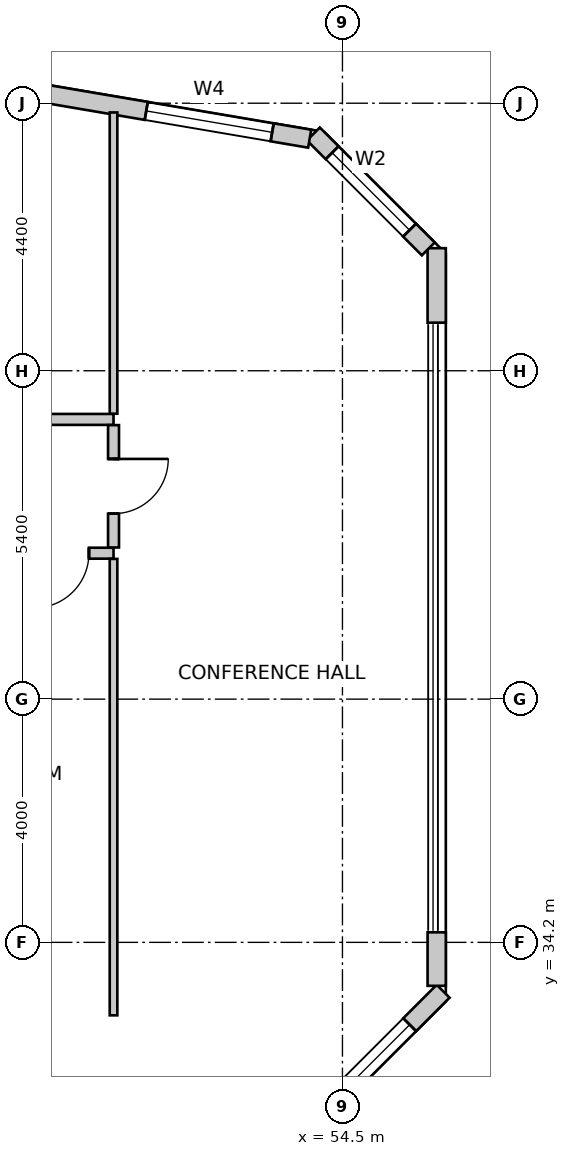
"""IFC4 building model, lengths in metres.
Left out: names, types, materials, properties, quantities, classifications, styles, units other than length and angle.
Written with IfcOpenShell. Run it as: python <this file> out.ifc"""

import sys

from ifc_helpers import new_model, si_unit, direction, frame, frame_2d, origin, place, context, subcontext, project, spatial, rectangle, extrude, source, transform, mapped, element, fill, save


model = new_model("IFC4")
c1 = context("Model", 3, precision=1e-05, world=origin(), true_north=direction((0.0, 1.0)))
c2 = subcontext(c1, "Body", "Model", "MODEL_VIEW")
j1 = project(units=[si_unit("LENGTHUNIT", "METRE"), si_unit("PLANEANGLEUNIT", "RADIAN")], contexts=[c1])
p1 = place(None, origin())
s1 = spatial("IfcSite", under=j1, at=p1, CompositionType="ELEMENT")
p2 = place(p1, origin())
s2 = spatial("IfcBuilding", under=s1, at=p2, CompositionType="ELEMENT")
p3 = place(p2, frame((0.0, 0.0, 87.0)))
s3 = spatial("IfcBuildingStorey", under=s2, at=p3, CompositionType="ELEMENT", Elevation=87.0)
p4 = place(p3, frame((53.076, 30.316, 0.0), z_axis=(0.0, 0.0, 1.0), x_axis=(0.707078757535, 0.707134803727, 0.0)))
e1 = element("IfcWall", 1, at=p4, inside=s3, PredefinedType="SOLIDWALL", context=c2, shape_type="SweptSolid", body=[
    extrude(rectangle(XDim=4.356, YDim=0.3, at=frame_2d((2.178, 0.0))), origin(), (0.0, 0.0, 1.0), 3.75),
])
m1 = source(origin(), c2, "Body", "SweptSolid", [
    extrude(rectangle(XDim=2.8, YDim=2.4, at=frame_2d((1.4, 1.2))), frame((0.0, 0.16, 0.0), z_axis=(0.0, -1.0, 0.0), x_axis=(1.0, 0.0, 0.0)), (0.0, 0.0, 1.0), 0.32),
])
p5 = place(p4, frame((0.778, 0.0, 0.85)))
e2 = element("IfcOpeningElement", 2, at=p5, cuts=e1, PredefinedType="OPENING", context=c2, shape_type="MappedRepresentation", body=[
    mapped(m1, transform((0.0, 0.0, 0.0), scale=1.0)),
])
p6 = place(p3, frame((56.05, 33.485, 0.0), z_axis=(0.0, 0.0, 1.0), x_axis=(0.0, 1.0, 0.0)))
e3 = element("IfcWall", 3, at=p6, inside=s3, PredefinedType="SOLIDWALL", context=c2, shape_type="SweptSolid", body=[
    extrude(rectangle(XDim=0.88, YDim=0.3, at=frame_2d((0.44, 0.0))), origin(), (0.0, 0.0, 1.0), 3.75),
])
p7 = place(p3, frame((56.05, 44.391, 0.0), z_axis=(0.0, 0.0, 1.0), x_axis=(0.0, 1.0, 0.0)))
e4 = element("IfcWall", 4, at=p7, inside=s3, PredefinedType="SOLIDWALL", context=c2, shape_type="SweptSolid", body=[
    extrude(rectangle(XDim=1.225, YDim=0.3, at=frame_2d((0.613, 0.0))), origin(), (0.0, 0.0, 1.0), 3.75),
])
p8 = place(p3, frame((55.912, 45.604, 0.0), z_axis=(0.0, 0.0, 1.0), x_axis=(-0.707152443695, 0.707061115729, 0.0)))
e5 = element("IfcWall", 5, at=p8, inside=s3, PredefinedType="SOLIDWALL", context=c2, shape_type="SweptSolid", body=[
    extrude(rectangle(XDim=2.673, YDim=0.3, at=frame_2d((1.337, 0.0))), origin(), (0.0, 0.0, 1.0), 3.75),
])
m2 = source(origin(), c2, "Body", "SweptSolid", [
    extrude(rectangle(XDim=1.8, YDim=2.1, at=frame_2d((0.9, 1.05))), frame((0.0, 0.16, 0.0), z_axis=(0.0, -1.0, 0.0), x_axis=(1.0, 0.0, 0.0)), (0.0, 0.0, 1.0), 0.32),
])
p9 = place(p8, frame((0.437, 0.0, 0.85)))
e6 = element("IfcOpeningElement", 6, at=p9, cuts=e5, PredefinedType="OPENING", context=c2, shape_type="MappedRepresentation", body=[
    mapped(m2, transform((0.0, 0.0, 0.0), scale=1.0)),
])
p10 = place(p3, frame((53.961, 47.417, 0.0), z_axis=(0.0, 0.0, 1.0), x_axis=(-0.985865713455, 0.167537443678, 0.0)))
e7 = element("IfcWall", 7, at=p10, inside=s3, PredefinedType="SOLIDWALL", context=c2, shape_type="SweptSolid", body=[
    extrude(rectangle(XDim=32.537, YDim=0.3, at=frame_2d((16.269, 0.0))), origin(), (0.0, 0.0, 1.0), 3.75),
])
m3 = source(origin(), c2, "Body", "SweptSolid", [
    extrude(rectangle(XDim=2.1, YDim=2.0, at=frame_2d((1.05, 1.0))), frame((0.0, 0.16, 0.0), z_axis=(0.0, -1.0, 0.0), x_axis=(1.0, 0.0, 0.0)), (0.0, 0.0, 1.0), 0.32),
])
p11 = place(p10, frame((0.626, 0.0, 0.85)))
e8 = element("IfcOpeningElement", 8, at=p11, cuts=e7, PredefinedType="OPENING", context=c2, shape_type="MappedRepresentation", body=[
    mapped(m3, transform((0.0, 0.0, 0.0), scale=1.0)),
])
m4 = source(origin(), c2, "Body", "SweptSolid", [
    extrude(rectangle(XDim=2.4, YDim=2.2, at=frame_2d((1.2, 1.1))), frame((0.0, 0.16, 0.0), z_axis=(0.0, -1.0, 0.0), x_axis=(1.0, 0.0, 0.0)), (0.0, 0.0, 1.0), 0.32),
])
p12 = place(p10, frame((4.504, 0.0, 0.85)))
e9 = element("IfcOpeningElement", 9, at=p12, cuts=e7, PredefinedType="OPENING", context=c2, shape_type="MappedRepresentation", body=[
    mapped(m4, transform((0.0, 0.0, 0.0), scale=1.0)),
])
p13 = place(p10, frame((8.768, 0.0, 0.85)))
e10 = element("IfcOpeningElement", 10, at=p13, cuts=e7, PredefinedType="OPENING", context=c2, shape_type="MappedRepresentation", body=[
    mapped(m1, transform((0.0, 0.0, 0.0), scale=1.0)),
])
p14 = place(p10, frame((14.234, 0.0, 0.85)))
e11 = element("IfcOpeningElement", 11, at=p14, cuts=e7, PredefinedType="OPENING", context=c2, shape_type="MappedRepresentation", body=[
    mapped(m4, transform((0.0, 0.0, 0.0), scale=1.0)),
])
p15 = place(p10, frame((19.222, 0.0, 0.85)))
e12 = element("IfcOpeningElement", 12, at=p15, cuts=e7, PredefinedType="OPENING", context=c2, shape_type="MappedRepresentation", body=[
    mapped(m1, transform((0.0, 0.0, 0.0), scale=1.0)),
])
p16 = place(p10, frame((25.095, 0.0, 0.85)))
e13 = element("IfcOpeningElement", 13, at=p16, cuts=e7, PredefinedType="OPENING", context=c2, shape_type="MappedRepresentation", body=[
    mapped(m4, transform((0.0, 0.0, 0.0), scale=1.0)),
])
p17 = place(p10, frame((29.595, 0.0, 0.85)))
e14 = element("IfcOpeningElement", 14, at=p17, cuts=e7, PredefinedType="OPENING", context=c2, shape_type="MappedRepresentation", body=[
    mapped(m4, transform((0.0, 0.0, 0.0), scale=1.0)),
])
p18 = place(p3, frame((50.735, 40.6, 0.0), z_axis=(0.0, 0.0, 1.0), x_axis=(-1.0, 0.0, 0.0)))
e15 = element("IfcWall", 15, at=p18, inside=s3, PredefinedType="PARTITIONING", context=c2, shape_type="SweptSolid", body=[
    extrude(rectangle(XDim=4.072, YDim=0.18, at=frame_2d((2.036, 0.0))), origin(), (0.0, 0.0, 1.0), 3.125),
])
m5 = source(origin(), c2, "Body", "SweptSolid", [
    extrude(rectangle(XDim=0.9, YDim=2.15, at=frame_2d((0.45, 1.075))), frame((0.0, 0.1, 0.0), z_axis=(0.0, -1.0, 0.0), x_axis=(1.0, 0.0, 0.0)), (0.0, 0.0, 1.0), 0.2),
])
p19 = place(p18, frame((0.404, 0.0, 0.0)))
e16 = element("IfcOpeningElement", 16, at=p19, cuts=e15, PredefinedType="OPENING", context=c2, shape_type="MappedRepresentation", body=[
    mapped(m5, transform((0.0, 0.0, 0.0), scale=1.0)),
])
p20 = place(p3, frame((41.662, 42.8, 0.0), z_axis=(0.0, 0.0, 1.0), x_axis=(1.0, 0.0, 0.0)))
e17 = element("IfcWall", 17, at=p20, inside=s3, PredefinedType="PARTITIONING", context=c2, shape_type="SweptSolid", body=[
    extrude(rectangle(XDim=9.073, YDim=0.18, at=frame_2d((4.537, 0.0))), origin(), (0.0, 0.0, 1.0), 3.125),
])
p21 = place(p20, frame((4.026, 0.0, 0.0)))
e18 = element("IfcOpeningElement", 18, at=p21, cuts=e17, PredefinedType="OPENING", context=c2, shape_type="MappedRepresentation", body=[
    mapped(m5, transform((0.0, 0.0, 0.0), scale=1.0)),
])
p22 = place(p3, frame((50.735, 42.706, 0.0), z_axis=(0.0, 0.0, 1.0), x_axis=(0.0, -1.0, 0.0)))
e19 = element("IfcWall", 19, at=p22, inside=s3, PredefinedType="PARTITIONING", context=c2, shape_type="SweptSolid", body=[
    extrude(rectangle(XDim=2.012, YDim=0.18, at=frame_2d((1.006, 0.0))), origin(), (0.0, 0.0, 1.0), 3.75),
])
p23 = place(p22, frame((0.556, 0.0, 0.0)))
e20 = element("IfcOpeningElement", 20, at=p23, cuts=e19, PredefinedType="OPENING", context=c2, shape_type="MappedRepresentation", body=[
    mapped(m5, transform((0.0, 0.0, 0.0), scale=1.0)),
])
p24 = place(p3, frame((50.735, 40.506, 0.0), z_axis=(0.0, 0.0, 1.0), x_axis=(0.0, -1.0, 0.0)))
e21 = element("IfcWall", 21, at=p24, inside=s3, PredefinedType="PARTITIONING", context=c2, shape_type="SweptSolid", body=[
    extrude(rectangle(XDim=7.506, YDim=0.125, at=frame_2d((3.753, 0.0))), origin(), (0.0, 0.0, 1.0), 3.75),
])
p25 = place(p3, frame((50.735, 47.848, 0.0), z_axis=(0.0, 0.0, 1.0), x_axis=(0.0, -1.0, 0.0)))
e22 = element("IfcWall", 22, at=p25, inside=s3, PredefinedType="PARTITIONING", context=c2, shape_type="SweptSolid", body=[
    extrude(rectangle(XDim=4.954, YDim=0.125, at=frame_2d((2.477, 0.0))), origin(), (0.0, 0.0, 1.0), 3.75),
])
m6 = source(origin(), c2, "Body", "SweptSolid", [
    extrude(rectangle(XDim=2.8, YDim=2.4, at=frame_2d((1.4, 1.2))), frame((0.0, -0.015, 0.0), z_axis=(0.0, -1.0, 0.0), x_axis=(1.0, 0.0, 0.0)), (0.0, 0.0, 1.0), 0.06),
])
p26 = place(p5, origin())
e23 = element("IfcWindow", 23, at=p26, inside=s3, PartitioningType="SINGLE_PANEL", PredefinedType="WINDOW", context=c2, shape_type="MappedRepresentation", body=[
    mapped(m6, transform((0.0, 0.0, 0.0), scale=1.0)),
])
fill(e2, e23)
m7 = source(origin(), c2, "Body", "SweptSolid", [
    extrude(rectangle(XDim=1.8, YDim=2.1, at=frame_2d((0.9, 1.05))), frame((0.0, -0.015, 0.0), z_axis=(0.0, -1.0, 0.0), x_axis=(1.0, 0.0, 0.0)), (0.0, 0.0, 1.0), 0.06),
])
p27 = place(p9, origin())
e24 = element("IfcWindow", 24, at=p27, inside=s3, PartitioningType="SINGLE_PANEL", PredefinedType="WINDOW", context=c2, shape_type="MappedRepresentation", body=[
    mapped(m7, transform((0.0, 0.0, 0.0), scale=1.0)),
])
fill(e6, e24)
m8 = source(origin(), c2, "Body", "SweptSolid", [
    extrude(rectangle(XDim=2.1, YDim=2.0, at=frame_2d((1.05, 1.0))), frame((0.0, -0.015, 0.0), z_axis=(0.0, -1.0, 0.0), x_axis=(1.0, 0.0, 0.0)), (0.0, 0.0, 1.0), 0.06),
])
p28 = place(p11, origin())
e25 = element("IfcWindow", 25, at=p28, inside=s3, PartitioningType="SINGLE_PANEL", PredefinedType="WINDOW", context=c2, shape_type="MappedRepresentation", body=[
    mapped(m8, transform((0.0, 0.0, 0.0), scale=1.0)),
])
fill(e8, e25)
m9 = source(origin(), c2, "Body", "SweptSolid", [
    extrude(rectangle(XDim=0.9, YDim=2.15, at=frame_2d((0.45, 1.075))), frame((0.0, 0.025, 0.0), z_axis=(0.0, -1.0, 0.0), x_axis=(1.0, 0.0, 0.0)), (0.0, 0.0, 1.0), 0.05),
])
p29 = place(p19, origin())
e26 = element("IfcDoor", 26, at=p29, inside=s3, OperationType="SINGLE_SWING_RIGHT", PredefinedType="DOOR", context=c2, shape_type="MappedRepresentation", body=[
    mapped(m9, transform((0.0, 0.0, 0.0), scale=1.0)),
])
fill(e16, e26)
p30 = place(p23, origin())
e27 = element("IfcDoor", 27, at=p30, inside=s3, OperationType="SINGLE_SWING_LEFT", PredefinedType="DOOR", context=c2, shape_type="MappedRepresentation", body=[
    mapped(m9, transform((0.0, 0.0, 0.0), scale=1.0)),
])
fill(e20, e27)
save(model, sys.argv[1])
